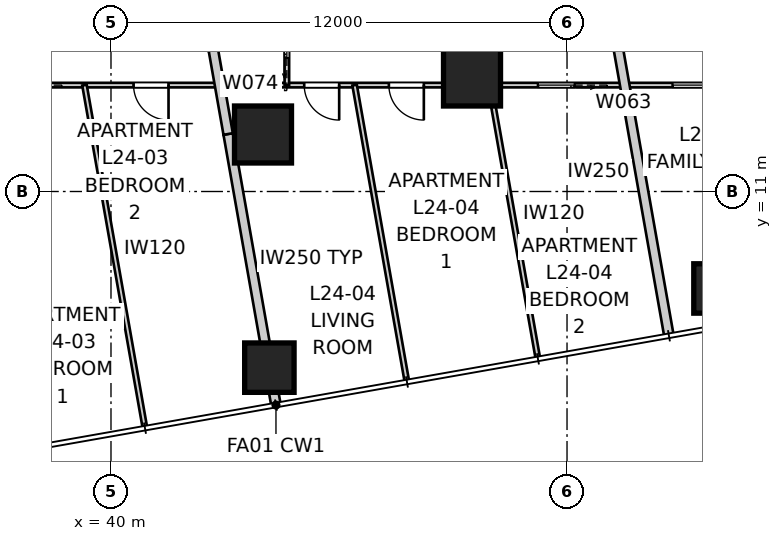
"""IFC4 building model, lengths in metres.
Left out: names, types, materials, properties, quantities, classifications, styles, units other than length and angle.
Written with IfcOpenShell. Run it as: python <this file> out.ifc"""

import sys

from ifc_helpers import new_model, si_unit, direction, frame, frame_2d, origin, origin_2d, place, context, subcontext, project, spatial, rectangle, extrude, element, fill, save


model = new_model("IFC4")
c1 = context("Model", 3, precision=1e-05, world=origin(), true_north=direction((0.0, 1.0)))
c2 = subcontext(c1, "Body", "Model", "MODEL_VIEW")
j1 = project(units=[si_unit("LENGTHUNIT", "METRE"), si_unit("PLANEANGLEUNIT", "RADIAN")], contexts=[c1])
p1 = place(None, origin())
s1 = spatial("IfcSite", under=j1, at=p1, CompositionType="ELEMENT")
p2 = place(p1, origin())
s2 = spatial("IfcBuilding", under=s1, at=p2, CompositionType="ELEMENT")
p3 = place(p2, frame((0.0, 0.0, 89.6)))
s3 = spatial("IfcBuildingStorey", under=s2, at=p3, CompositionType="ELEMENT", Elevation=89.6)
for number, where, z_axis, x_axis in (
    (1, (44.167, 6.365, 0.0), (0.0, 0.0, 1.0), (1.0, 0.0, 0.0)),
    (2, (55.985, 8.448, 0.0), (0.0, 0.0, 1.0), (1.0, 0.0, 0.0)),
):
    element("IfcColumn", number, at=place(p3, frame(where, z_axis=z_axis, x_axis=x_axis)), inside=s3, PredefinedType="COLUMN", context=c2, shape_type="SweptSolid", body=[
        extrude(rectangle(XDim=1.3, YDim=1.3, at=origin_2d()), origin(), (0.0, 0.0, 1.0), 3.4),
    ])
for number, where, z_axis, x_axis in (
    (3, (44.0, 12.5, 0.0), (0.0, 0.0, 1.0), (1.0, 0.0, 0.0)),
    (4, (49.5, 14.0, 0.0), (0.0, 0.0, 1.0), (1.0, 0.0, 0.0)),
):
    element("IfcColumn", number, at=place(p3, frame(where, z_axis=z_axis, x_axis=x_axis)), inside=s3, PredefinedType="COLUMN", context=c2, shape_type="SweptSolid", body=[
        extrude(rectangle(XDim=1.5, YDim=1.5, at=origin_2d()), origin(), (0.0, 0.0, 1.0), 3.4),
    ])
p4 = place(p3, frame((44.341, 5.38, 0.0), z_axis=(0.0, 0.0, 1.0), x_axis=(-0.173677660443, 0.984802553948, 0.0)))
e5 = element("IfcWall", 5, at=p4, inside=s3, PredefinedType="PARTITIONING", context=c2, shape_type="SweptSolid", body=[
    extrude(rectangle(XDim=7.244, YDim=0.25, at=frame_2d((3.622, 0.0))), origin(), (0.0, 0.0, 1.0), 3.25),
])
p5 = place(p3, frame((43.083, 12.513, 0.0), z_axis=(0.0, 0.0, 1.0), x_axis=(-0.17363609779, 0.984809882944, 0.0)))
e6 = element("IfcWall", 6, at=p5, inside=s3, PredefinedType="PARTITIONING", context=c2, shape_type="SweptSolid", body=[
    extrude(rectangle(XDim=2.24, YDim=0.25, at=frame_2d((1.12, 0.0))), origin(), (0.0, 0.0, 1.0), 2.796),
])
p6 = place(p3, frame((54.682, 7.203, 0.0), z_axis=(0.0, 0.0, 1.0), x_axis=(-0.173630137029, 0.984810933893, 0.0)))
e7 = element("IfcWall", 7, at=p6, inside=s3, PredefinedType="PARTITIONING", context=c2, shape_type="SweptSolid", body=[
    extrude(rectangle(XDim=9.154, YDim=0.25, at=frame_2d((4.577, 0.0))), origin(), (0.0, 0.0, 1.0), 3.25),
])
p7 = place(p3, frame((57.0, 13.8, 0.0), z_axis=(0.0, 0.0, 1.0), x_axis=(-1.0, 0.0, 0.0)))
e8 = element("IfcWall", 8, at=p7, inside=s3, PredefinedType="PARTITIONING", context=c2, shape_type="SweptSolid", body=[
    extrude(rectangle(XDim=34.0, YDim=0.12, at=frame_2d((17.0, 0.0))), origin(), (0.0, 0.0, 1.0), 2.55),
])
p8 = place(p7, frame((8.768, 0.0, 0.0)))
e9 = element("IfcOpeningElement", 9, at=p8, cuts=e8, PredefinedType="OPENING", context=c2, shape_type="SweptSolid", body=[
    extrude(rectangle(XDim=0.92, YDim=2.34, at=frame_2d((0.46, 1.17))), frame((0.0, 0.07, 0.0), z_axis=(0.0, -1.0, 0.0), x_axis=(1.0, 0.0, 0.0)), (0.0, 0.0, 1.0), 0.14),
])
p9 = place(p7, frame((10.995, 0.0, 0.0)))
e10 = element("IfcOpeningElement", 10, at=p9, cuts=e8, PredefinedType="OPENING", context=c2, shape_type="SweptSolid", body=[
    extrude(rectangle(XDim=0.92, YDim=2.34, at=frame_2d((0.46, 1.17))), frame((0.0, 0.07, 0.0), z_axis=(0.0, -1.0, 0.0), x_axis=(1.0, 0.0, 0.0)), (0.0, 0.0, 1.0), 0.14),
])
p10 = place(p7, frame((15.486, 0.0, 0.0)))
e11 = element("IfcOpeningElement", 11, at=p10, cuts=e8, PredefinedType="OPENING", context=c2, shape_type="SweptSolid", body=[
    extrude(rectangle(XDim=0.92, YDim=2.34, at=frame_2d((0.46, 1.17))), frame((0.0, 0.07, 0.0), z_axis=(0.0, -1.0, 0.0), x_axis=(1.0, 0.0, 0.0)), (0.0, 0.0, 1.0), 0.14),
])
p11 = place(p7, frame((4.804, 0.0, 0.0)))
e12 = element("IfcOpeningElement", 12, at=p11, cuts=e8, PredefinedType="OPENING", context=c2, shape_type="SweptSolid", body=[
    extrude(rectangle(XDim=0.96, YDim=2.1, at=frame_2d((0.48, 1.05))), frame((0.0, 0.07, 0.0), z_axis=(0.0, -1.0, 0.0), x_axis=(1.0, 0.0, 0.0)), (0.0, 0.0, 1.0), 0.14),
])
p12 = place(p7, frame((19.155, 0.0, 0.0)))
e13 = element("IfcOpeningElement", 13, at=p12, cuts=e8, PredefinedType="OPENING", context=c2, shape_type="SweptSolid", body=[
    extrude(rectangle(XDim=0.96, YDim=2.1, at=frame_2d((0.48, 1.05))), frame((0.0, 0.07, 0.0), z_axis=(0.0, -1.0, 0.0), x_axis=(1.0, 0.0, 0.0)), (0.0, 0.0, 1.0), 0.14),
])
p13 = place(p7, frame((31.473, 0.0, 0.0)))
e14 = element("IfcOpeningElement", 14, at=p13, cuts=e8, PredefinedType="OPENING", context=c2, shape_type="SweptSolid", body=[
    extrude(rectangle(XDim=0.96, YDim=2.1, at=frame_2d((0.48, 1.05))), frame((0.0, 0.07, 0.0), z_axis=(0.0, -1.0, 0.0), x_axis=(1.0, 0.0, 0.0)), (0.0, 0.0, 1.0), 0.14),
])
p14 = place(p7, frame((1.261, 0.0, 0.0)))
e15 = element("IfcOpeningElement", 15, at=p14, cuts=e8, PredefinedType="OPENING", context=c2, shape_type="SweptSolid", body=[
    extrude(rectangle(XDim=0.96, YDim=2.1, at=frame_2d((0.48, 1.05))), frame((0.0, 0.07, 0.0), z_axis=(0.0, -1.0, 0.0), x_axis=(1.0, 0.0, 0.0)), (0.0, 0.0, 1.0), 0.14),
])
p15 = place(p7, frame((22.627, 0.0, 0.0)))
e16 = element("IfcOpeningElement", 16, at=p15, cuts=e8, PredefinedType="OPENING", context=c2, shape_type="SweptSolid", body=[
    extrude(rectangle(XDim=0.96, YDim=2.1, at=frame_2d((0.48, 1.05))), frame((0.0, 0.07, 0.0), z_axis=(0.0, -1.0, 0.0), x_axis=(1.0, 0.0, 0.0)), (0.0, 0.0, 1.0), 0.14),
])
p16 = place(p3, frame((39.302, 13.8, 0.0), z_axis=(0.0, 0.0, 1.0), x_axis=(0.173652576186, -0.984806977424, 0.0)))
e17 = element("IfcWall", 17, at=p16, inside=s3, PredefinedType="PARTITIONING", context=c2, shape_type="SweptSolid", body=[
    extrude(rectangle(XDim=9.127, YDim=0.12, at=frame_2d((4.563, 0.0))), origin(), (0.0, 0.0, 1.0), 3.25),
])
p17 = place(p3, frame((49.185, 16.2, 0.0), z_axis=(0.0, 0.0, 1.0), x_axis=(0.0, -1.0, 0.0)))
e18 = element("IfcWall", 18, at=p17, inside=s3, PredefinedType="PARTITIONING", context=c2, shape_type="SweptSolid", body=[
    extrude(rectangle(XDim=2.4, YDim=0.12, at=frame_2d((1.2, 0.0))), origin(), (0.0, 0.0, 1.0), 3.25),
])
p18 = place(p17, frame((0.42, 0.0, 0.0)))
e19 = element("IfcOpeningElement", 19, at=p18, cuts=e18, PredefinedType="OPENING", context=c2, shape_type="SweptSolid", body=[
    extrude(rectangle(XDim=0.96, YDim=2.1, at=frame_2d((0.48, 1.05))), frame((0.0, 0.07, 0.0), z_axis=(0.0, -1.0, 0.0), x_axis=(1.0, 0.0, 0.0)), (0.0, 0.0, 1.0), 0.14),
])
p19 = place(p3, frame((44.628, 13.8, 0.0), z_axis=(0.0, 0.0, 1.0), x_axis=(0.0, 1.0, 0.0)))
e20 = element("IfcWall", 20, at=p19, inside=s3, PredefinedType="PARTITIONING", context=c2, shape_type="SweptSolid", body=[
    extrude(rectangle(XDim=2.4, YDim=0.12, at=frame_2d((1.2, 0.0))), origin(), (0.0, 0.0, 1.0), 3.25),
])
p20 = place(p19, frame((0.72, 0.0, 0.0)))
e21 = element("IfcOpeningElement", 21, at=p20, cuts=e20, PredefinedType="OPENING", context=c2, shape_type="SweptSolid", body=[
    extrude(rectangle(XDim=0.96, YDim=2.1, at=frame_2d((0.48, 1.05))), frame((0.0, 0.07, 0.0), z_axis=(0.0, -1.0, 0.0), x_axis=(1.0, 0.0, 0.0)), (0.0, 0.0, 1.0), 0.14),
])
p21 = place(p3, frame((46.41, 13.8, 0.0), z_axis=(0.0, 0.0, 1.0), x_axis=(0.173645935638, -0.98480814834, 0.0)))
e22 = element("IfcWall", 22, at=p21, inside=s3, PredefinedType="PARTITIONING", context=c2, shape_type="SweptSolid", body=[
    extrude(rectangle(XDim=7.893, YDim=0.12, at=frame_2d((3.947, 0.0))), origin(), (0.0, 0.0, 1.0), 3.25),
])
p22 = place(p3, frame((49.964, 13.8, 0.0), z_axis=(0.0, 0.0, 1.0), x_axis=(0.173647508681, -0.984807870972, 0.0)))
e23 = element("IfcWall", 23, at=p22, inside=s3, PredefinedType="PARTITIONING", context=c2, shape_type="SweptSolid", body=[
    extrude(rectangle(XDim=7.276, YDim=0.12, at=frame_2d((3.638, 0.0))), origin(), (0.0, 0.0, 1.0), 3.25),
])
p23 = place(p8, origin())
e24 = element("IfcDoor", 24, at=p23, inside=s3, OperationType="SINGLE_SWING_LEFT", PredefinedType="DOOR", context=c2, shape_type="SweptSolid", body=[
    extrude(rectangle(XDim=0.92, YDim=2.34, at=frame_2d((0.46, 1.17))), frame((0.0, 0.025, 0.0), z_axis=(0.0, -1.0, 0.0), x_axis=(1.0, 0.0, 0.0)), (0.0, 0.0, 1.0), 0.05),
])
fill(e9, e24)
p24 = place(p20, origin())
e25 = element("IfcDoor", 25, at=p24, inside=s3, OperationType="SLIDING_TO_LEFT", PredefinedType="DOOR", context=c2, shape_type="SweptSolid", body=[
    extrude(rectangle(XDim=0.96, YDim=2.1, at=frame_2d((0.48, 1.05))), frame((0.0, 0.025, 0.0), z_axis=(0.0, -1.0, 0.0), x_axis=(1.0, 0.0, 0.0)), (0.0, 0.0, 1.0), 0.05),
])
fill(e21, e25)
p25 = place(p9, origin())
e26 = element("IfcDoor", 26, at=p25, inside=s3, OperationType="SINGLE_SWING_LEFT", PredefinedType="DOOR", context=c2, shape_type="SweptSolid", body=[
    extrude(rectangle(XDim=0.92, YDim=2.34, at=frame_2d((0.46, 1.17))), frame((0.0, 0.025, 0.0), z_axis=(0.0, -1.0, 0.0), x_axis=(1.0, 0.0, 0.0)), (0.0, 0.0, 1.0), 0.05),
])
fill(e10, e26)
p26 = place(p10, origin())
e27 = element("IfcDoor", 27, at=p26, inside=s3, OperationType="SINGLE_SWING_LEFT", PredefinedType="DOOR", context=c2, shape_type="SweptSolid", body=[
    extrude(rectangle(XDim=0.92, YDim=2.34, at=frame_2d((0.46, 1.17))), frame((0.0, 0.025, 0.0), z_axis=(0.0, -1.0, 0.0), x_axis=(1.0, 0.0, 0.0)), (0.0, 0.0, 1.0), 0.05),
])
fill(e11, e27)
p27 = place(p11, origin())
e28 = element("IfcDoor", 28, at=p27, inside=s3, OperationType="SLIDING_TO_LEFT", PredefinedType="DOOR", context=c2, shape_type="SweptSolid", body=[
    extrude(rectangle(XDim=0.96, YDim=2.1, at=frame_2d((0.48, 1.05))), frame((0.0, 0.025, 0.0), z_axis=(0.0, -1.0, 0.0), x_axis=(1.0, 0.0, 0.0)), (0.0, 0.0, 1.0), 0.05),
])
fill(e12, e28)
p28 = place(p14, origin())
e29 = element("IfcDoor", 29, at=p28, inside=s3, OperationType="SLIDING_TO_LEFT", PredefinedType="DOOR", context=c2, shape_type="SweptSolid", body=[
    extrude(rectangle(XDim=0.96, YDim=2.1, at=frame_2d((0.48, 1.05))), frame((0.0, 0.025, 0.0), z_axis=(0.0, -1.0, 0.0), x_axis=(1.0, 0.0, 0.0)), (0.0, 0.0, 1.0), 0.05),
])
fill(e15, e29)
save(model, sys.argv[1])
